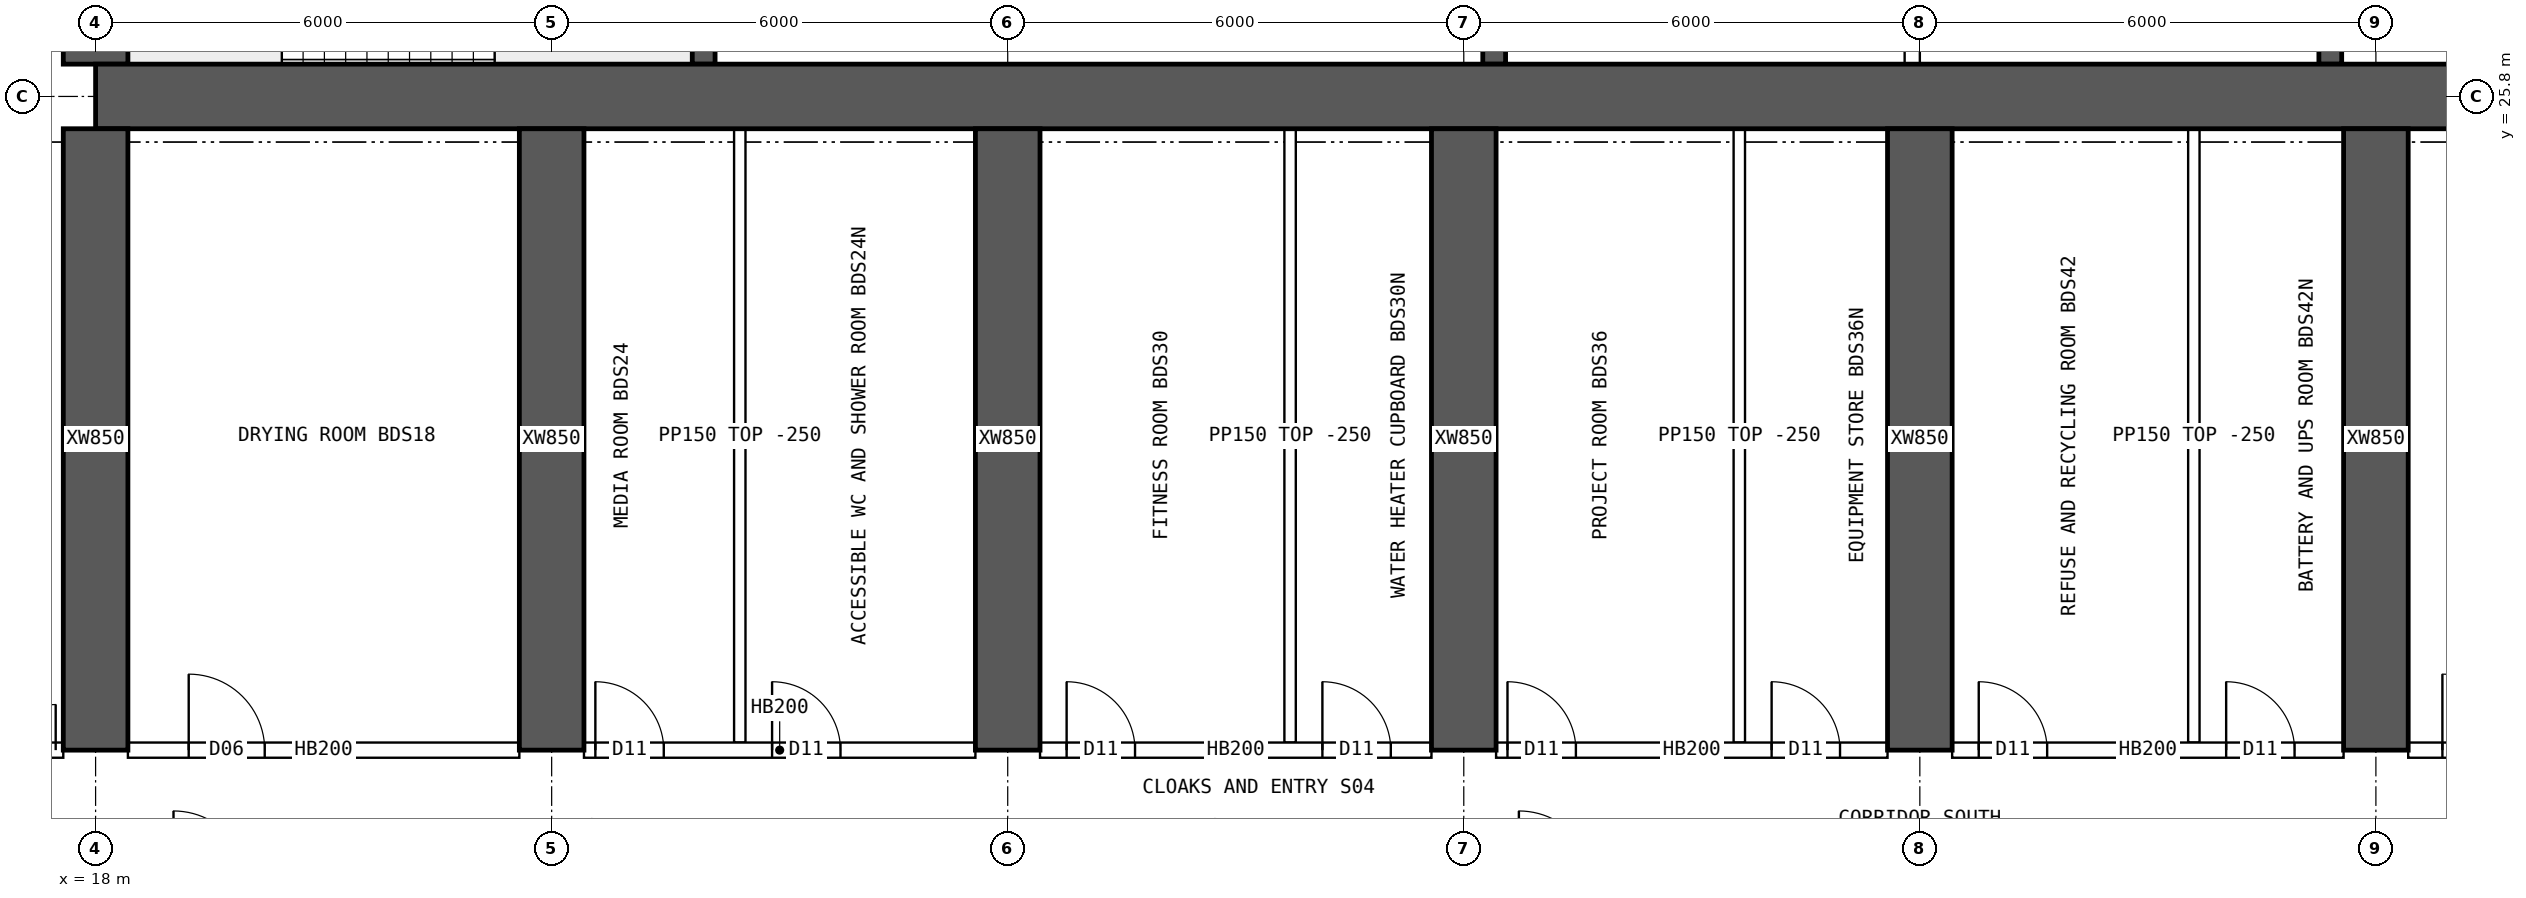
"""IFC4 building model, lengths in metres.
Left out: names, types, materials, properties, quantities, classifications, styles, units other than length and angle.
Written with IfcOpenShell. Run it as: python <this file> out.ifc"""

import sys

from ifc_helpers import new_model, si_unit, direction, frame, frame_2d, origin, place, context, subcontext, project, spatial, rectangle, extrude, element, fill, save


model = new_model("IFC4")
c1 = context("Model", 3, precision=1e-05, world=origin(), true_north=direction((0.0, 1.0)))
c2 = subcontext(c1, "Body", "Model", "MODEL_VIEW")
j1 = project(units=[si_unit("LENGTHUNIT", "METRE"), si_unit("PLANEANGLEUNIT", "RADIAN")], contexts=[c1])
p1 = place(None, origin())
s1 = spatial("IfcSite", under=j1, at=p1, CompositionType="ELEMENT")
p2 = place(p1, origin())
s2 = spatial("IfcBuilding", under=s1, at=p2, CompositionType="ELEMENT")
p3 = place(p2, frame((0.0, 0.0, 148.6)))
s3 = spatial("IfcBuildingStorey", under=s2, at=p3, CompositionType="ELEMENT", Elevation=148.6)
p4 = place(p3, frame((18.0, 25.8, 0.0), z_axis=(0.0, 0.0, 1.0), x_axis=(1.0, 0.0, 0.0)))
e1 = element("IfcWall", 1, at=p4, inside=s3, PredefinedType="SHEAR", context=c2, shape_type="SweptSolid", body=[
    extrude(rectangle(XDim=48.0, YDim=0.85, at=frame_2d((24.0, 0.0))), origin(), (0.0, 0.0, 1.0), 3.75),
])
p5 = place(p3, frame((18.0, 26.225, 0.0), z_axis=(0.0, 0.0, 1.0), x_axis=(0.0, 1.0, 0.0)))
e2 = element("IfcWall", 2, at=p5, inside=s3, PredefinedType="SHEAR", context=c2, shape_type="SweptSolid", body=[
    extrude(rectangle(XDim=11.55, YDim=0.85, at=frame_2d((5.775, 0.0))), origin(), (0.0, 0.0, 1.0), 3.75),
])
p6 = place(p5, frame((5.075, 0.0, 0.0)))
e3 = element("IfcOpeningElement", 3, at=p6, cuts=e2, PredefinedType="OPENING", context=c2, shape_type="SweptSolid", body=[
    extrude(rectangle(XDim=1.2, YDim=2.1, at=frame_2d((0.6, 1.05))), frame((0.0, 0.435, 0.0), z_axis=(0.0, -1.0, 0.0), x_axis=(1.0, 0.0, 0.0)), (0.0, 0.0, 1.0), 0.87),
])
for number, where, z_axis, x_axis in (
    (4, (26.0, 26.225, 0.0), (0.0, 0.0, 1.0), (0.0, 1.0, 0.0)),
    (5, (36.4, 26.225, 0.0), (0.0, 0.0, 1.0), (0.0, 1.0, 0.0)),
    (6, (47.4, 26.225, 0.0), (0.0, 0.0, 1.0), (0.0, 1.0, 0.0)),
):
    element("IfcWall", number, at=place(p3, frame(where, z_axis=z_axis, x_axis=x_axis)), inside=s3, PredefinedType="SHEAR", context=c2, shape_type="SweptSolid", body=[
        extrude(rectangle(XDim=4.025, YDim=0.3, at=frame_2d((2.012, 0.0))), origin(), (0.0, 0.0, 1.0), 3.75),
    ])
for number, where, z_axis, x_axis in (
    (7, (18.0, 17.2, 0.0), (0.0, 0.0, 1.0), (0.0, 1.0, 0.0)),
    (8, (24.0, 17.2, 0.0), (0.0, 0.0, 1.0), (0.0, 1.0, 0.0)),
    (9, (30.0, 17.2, 0.0), (0.0, 0.0, 1.0), (0.0, 1.0, 0.0)),
    (10, (36.0, 17.2, 0.0), (0.0, 0.0, 1.0), (0.0, 1.0, 0.0)),
    (11, (42.0, 17.2, 0.0), (0.0, 0.0, 1.0), (0.0, 1.0, 0.0)),
    (12, (48.0, 17.2, 0.0), (0.0, 0.0, 1.0), (0.0, 1.0, 0.0)),
):
    element("IfcWall", number, at=place(p3, frame(where, z_axis=z_axis, x_axis=x_axis)), inside=s3, PredefinedType="SHEAR", context=c2, shape_type="SweptSolid", body=[
        extrude(rectangle(XDim=8.175, YDim=0.85, at=frame_2d((4.087, 0.0))), origin(), (0.0, 0.0, 1.0), 3.75),
    ])
p7 = place(p3, frame((41.9, 26.225, 0.0), z_axis=(0.0, 0.0, 1.0), x_axis=(0.0, 1.0, 0.0)))
e13 = element("IfcWall", 13, at=p7, inside=s3, PredefinedType="SOLIDWALL", context=c2, shape_type="SweptSolid", body=[
    extrude(rectangle(XDim=4.025, YDim=0.2, at=frame_2d((2.012, 0.0))), origin(), (0.0, 0.0, 1.0), 3.5),
])
p8 = place(p3, frame((15.6, 17.2, 0.0), z_axis=(0.0, 0.0, 1.0), x_axis=(1.0, 0.0, 0.0)))
e14 = element("IfcWall", 14, at=p8, inside=s3, PredefinedType="SOLIDWALL", context=c2, shape_type="SweptSolid", body=[
    extrude(rectangle(XDim=1.975, YDim=0.2, at=frame_2d((0.987, 0.0))), origin(), (0.0, 0.0, 1.0), 3.5),
])
p9 = place(p8, frame((0.675, 0.0, 0.0)))
e15 = element("IfcOpeningElement", 15, at=p9, cuts=e14, PredefinedType="OPENING", context=c2, shape_type="SweptSolid", body=[
    extrude(rectangle(XDim=1.2, YDim=2.1, at=frame_2d((0.6, 1.05))), frame((0.0, 0.11, 0.0), z_axis=(0.0, -1.0, 0.0), x_axis=(1.0, 0.0, 0.0)), (0.0, 0.0, 1.0), 0.22),
])
p10 = place(p3, frame((18.425, 17.2, 0.0), z_axis=(0.0, 0.0, 1.0), x_axis=(1.0, 0.0, 0.0)))
e16 = element("IfcWall", 16, at=p10, inside=s3, PredefinedType="SOLIDWALL", context=c2, shape_type="SweptSolid", body=[
    extrude(rectangle(XDim=5.15, YDim=0.2, at=frame_2d((2.575, 0.0))), origin(), (0.0, 0.0, 1.0), 3.5),
])
p11 = place(p10, frame((0.8, 0.0, 0.0)))
e17 = element("IfcOpeningElement", 17, at=p11, cuts=e16, PredefinedType="OPENING", context=c2, shape_type="SweptSolid", body=[
    extrude(rectangle(XDim=1.0, YDim=2.1, at=frame_2d((0.5, 1.05))), frame((0.0, 0.11, 0.0), z_axis=(0.0, -1.0, 0.0), x_axis=(1.0, 0.0, 0.0)), (0.0, 0.0, 1.0), 0.22),
])
p12 = place(p3, frame((24.425, 17.2, 0.0), z_axis=(0.0, 0.0, 1.0), x_axis=(1.0, 0.0, 0.0)))
e18 = element("IfcWall", 18, at=p12, inside=s3, PredefinedType="SOLIDWALL", context=c2, shape_type="SweptSolid", body=[
    extrude(rectangle(XDim=5.15, YDim=0.2, at=frame_2d((2.575, 0.0))), origin(), (0.0, 0.0, 1.0), 3.5),
])
p13 = place(p12, frame((0.15, 0.0, 0.0)))
e19 = element("IfcOpeningElement", 19, at=p13, cuts=e18, PredefinedType="OPENING", context=c2, shape_type="SweptSolid", body=[
    extrude(rectangle(XDim=0.9, YDim=2.1, at=frame_2d((0.45, 1.05))), frame((0.0, 0.11, 0.0), z_axis=(0.0, -1.0, 0.0), x_axis=(1.0, 0.0, 0.0)), (0.0, 0.0, 1.0), 0.22),
])
p14 = place(p12, frame((2.475, 0.0, 0.0)))
e20 = element("IfcOpeningElement", 20, at=p14, cuts=e18, PredefinedType="OPENING", context=c2, shape_type="SweptSolid", body=[
    extrude(rectangle(XDim=0.9, YDim=2.1, at=frame_2d((0.45, 1.05))), frame((0.0, 0.11, 0.0), z_axis=(0.0, -1.0, 0.0), x_axis=(1.0, 0.0, 0.0)), (0.0, 0.0, 1.0), 0.22),
])
p15 = place(p3, frame((30.425, 17.2, 0.0), z_axis=(0.0, 0.0, 1.0), x_axis=(1.0, 0.0, 0.0)))
e21 = element("IfcWall", 21, at=p15, inside=s3, PredefinedType="SOLIDWALL", context=c2, shape_type="SweptSolid", body=[
    extrude(rectangle(XDim=5.15, YDim=0.2, at=frame_2d((2.575, 0.0))), origin(), (0.0, 0.0, 1.0), 3.5),
])
p16 = place(p15, frame((0.35, 0.0, 0.0)))
e22 = element("IfcOpeningElement", 22, at=p16, cuts=e21, PredefinedType="OPENING", context=c2, shape_type="SweptSolid", body=[
    extrude(rectangle(XDim=0.9, YDim=2.1, at=frame_2d((0.45, 1.05))), frame((0.0, 0.11, 0.0), z_axis=(0.0, -1.0, 0.0), x_axis=(1.0, 0.0, 0.0)), (0.0, 0.0, 1.0), 0.22),
])
p17 = place(p15, frame((3.715, 0.0, 0.0)))
e23 = element("IfcOpeningElement", 23, at=p17, cuts=e21, PredefinedType="OPENING", context=c2, shape_type="SweptSolid", body=[
    extrude(rectangle(XDim=0.9, YDim=2.1, at=frame_2d((0.45, 1.05))), frame((0.0, 0.11, 0.0), z_axis=(0.0, -1.0, 0.0), x_axis=(1.0, 0.0, 0.0)), (0.0, 0.0, 1.0), 0.22),
])
p18 = place(p3, frame((36.425, 17.2, 0.0), z_axis=(0.0, 0.0, 1.0), x_axis=(1.0, 0.0, 0.0)))
e24 = element("IfcWall", 24, at=p18, inside=s3, PredefinedType="SOLIDWALL", context=c2, shape_type="SweptSolid", body=[
    extrude(rectangle(XDim=5.15, YDim=0.2, at=frame_2d((2.575, 0.0))), origin(), (0.0, 0.0, 1.0), 3.5),
])
p19 = place(p18, frame((0.15, 0.0, 0.0)))
e25 = element("IfcOpeningElement", 25, at=p19, cuts=e24, PredefinedType="OPENING", context=c2, shape_type="SweptSolid", body=[
    extrude(rectangle(XDim=0.9, YDim=2.1, at=frame_2d((0.45, 1.05))), frame((0.0, 0.11, 0.0), z_axis=(0.0, -1.0, 0.0), x_axis=(1.0, 0.0, 0.0)), (0.0, 0.0, 1.0), 0.22),
])
p20 = place(p18, frame((3.625, 0.0, 0.0)))
e26 = element("IfcOpeningElement", 26, at=p20, cuts=e24, PredefinedType="OPENING", context=c2, shape_type="SweptSolid", body=[
    extrude(rectangle(XDim=0.9, YDim=2.1, at=frame_2d((0.45, 1.05))), frame((0.0, 0.11, 0.0), z_axis=(0.0, -1.0, 0.0), x_axis=(1.0, 0.0, 0.0)), (0.0, 0.0, 1.0), 0.22),
])
p21 = place(p3, frame((42.425, 17.2, 0.0), z_axis=(0.0, 0.0, 1.0), x_axis=(1.0, 0.0, 0.0)))
e27 = element("IfcWall", 27, at=p21, inside=s3, PredefinedType="SOLIDWALL", context=c2, shape_type="SweptSolid", body=[
    extrude(rectangle(XDim=5.15, YDim=0.2, at=frame_2d((2.575, 0.0))), origin(), (0.0, 0.0, 1.0), 3.5),
])
p22 = place(p21, frame((0.35, 0.0, 0.0)))
e28 = element("IfcOpeningElement", 28, at=p22, cuts=e27, PredefinedType="OPENING", context=c2, shape_type="SweptSolid", body=[
    extrude(rectangle(XDim=0.9, YDim=2.1, at=frame_2d((0.45, 1.05))), frame((0.0, 0.11, 0.0), z_axis=(0.0, -1.0, 0.0), x_axis=(1.0, 0.0, 0.0)), (0.0, 0.0, 1.0), 0.22),
])
p23 = place(p21, frame((3.605, 0.0, 0.0)))
e29 = element("IfcOpeningElement", 29, at=p23, cuts=e27, PredefinedType="OPENING", context=c2, shape_type="SweptSolid", body=[
    extrude(rectangle(XDim=0.9, YDim=2.1, at=frame_2d((0.45, 1.05))), frame((0.0, 0.11, 0.0), z_axis=(0.0, -1.0, 0.0), x_axis=(1.0, 0.0, 0.0)), (0.0, 0.0, 1.0), 0.22),
])
p24 = place(p3, frame((48.425, 17.2, 0.0), z_axis=(0.0, 0.0, 1.0), x_axis=(1.0, 0.0, 0.0)))
e30 = element("IfcWall", 30, at=p24, inside=s3, PredefinedType="SOLIDWALL", context=c2, shape_type="SweptSolid", body=[
    extrude(rectangle(XDim=5.15, YDim=0.2, at=frame_2d((2.575, 0.0))), origin(), (0.0, 0.0, 1.0), 3.5),
])
p25 = place(p24, frame((0.45, 0.0, 0.0)))
e31 = element("IfcOpeningElement", 31, at=p25, cuts=e30, PredefinedType="OPENING", context=c2, shape_type="SweptSolid", body=[
    extrude(rectangle(XDim=1.0, YDim=2.1, at=frame_2d((0.5, 1.05))), frame((0.0, 0.11, 0.0), z_axis=(0.0, -1.0, 0.0), x_axis=(1.0, 0.0, 0.0)), (0.0, 0.0, 1.0), 0.22),
])
for number, where, z_axis, x_axis in (
    (32, (26.475, 17.3, 0.0), (0.0, 0.0, 1.0), (0.0, 1.0, 0.0)),
    (33, (33.715, 17.3, 0.0), (0.0, 0.0, 1.0), (0.0, 1.0, 0.0)),
    (34, (39.625, 17.3, 0.0), (0.0, 0.0, 1.0), (0.0, 1.0, 0.0)),
    (35, (45.605, 17.3, 0.0), (0.0, 0.0, 1.0), (0.0, 1.0, 0.0)),
):
    element("IfcWall", number, at=place(p3, frame(where, z_axis=z_axis, x_axis=x_axis)), inside=s3, PredefinedType="PARTITIONING", context=c2, shape_type="SweptSolid", body=[
        extrude(rectangle(XDim=8.075, YDim=0.15, at=frame_2d((4.038, 0.0))), origin(), (0.0, 0.0, 1.0), 3.5),
    ])
p26 = place(p9, origin())
e36 = element("IfcDoor", 36, at=p26, inside=s3, OperationType="DOUBLE_DOOR_SINGLE_SWING", PredefinedType="DOOR", context=c2, shape_type="SweptSolid", body=[
    extrude(rectangle(XDim=1.2, YDim=2.1, at=frame_2d((0.6, 1.05))), frame((0.0, 0.025, 0.0), z_axis=(0.0, -1.0, 0.0), x_axis=(1.0, 0.0, 0.0)), (0.0, 0.0, 1.0), 0.05),
])
fill(e15, e36)
p27 = place(p11, origin())
e37 = element("IfcDoor", 37, at=p27, inside=s3, OperationType="SINGLE_SWING_LEFT", PredefinedType="DOOR", context=c2, shape_type="SweptSolid", body=[
    extrude(rectangle(XDim=1.0, YDim=2.1, at=frame_2d((0.5, 1.05))), frame((0.0, 0.025, 0.0), z_axis=(0.0, -1.0, 0.0), x_axis=(1.0, 0.0, 0.0)), (0.0, 0.0, 1.0), 0.05),
])
fill(e17, e37)
p28 = place(p13, origin())
e38 = element("IfcDoor", 38, at=p28, inside=s3, OperationType="SINGLE_SWING_LEFT", PredefinedType="DOOR", context=c2, shape_type="SweptSolid", body=[
    extrude(rectangle(XDim=0.9, YDim=2.1, at=frame_2d((0.45, 1.05))), frame((0.0, 0.025, 0.0), z_axis=(0.0, -1.0, 0.0), x_axis=(1.0, 0.0, 0.0)), (0.0, 0.0, 1.0), 0.05),
])
fill(e19, e38)
p29 = place(p14, origin())
e39 = element("IfcDoor", 39, at=p29, inside=s3, OperationType="SINGLE_SWING_LEFT", PredefinedType="DOOR", context=c2, shape_type="SweptSolid", body=[
    extrude(rectangle(XDim=0.9, YDim=2.1, at=frame_2d((0.45, 1.05))), frame((0.0, 0.025, 0.0), z_axis=(0.0, -1.0, 0.0), x_axis=(1.0, 0.0, 0.0)), (0.0, 0.0, 1.0), 0.05),
])
fill(e20, e39)
p30 = place(p16, origin())
e40 = element("IfcDoor", 40, at=p30, inside=s3, OperationType="SINGLE_SWING_LEFT", PredefinedType="DOOR", context=c2, shape_type="SweptSolid", body=[
    extrude(rectangle(XDim=0.9, YDim=2.1, at=frame_2d((0.45, 1.05))), frame((0.0, 0.025, 0.0), z_axis=(0.0, -1.0, 0.0), x_axis=(1.0, 0.0, 0.0)), (0.0, 0.0, 1.0), 0.05),
])
fill(e22, e40)
p31 = place(p17, origin())
e41 = element("IfcDoor", 41, at=p31, inside=s3, OperationType="SINGLE_SWING_LEFT", PredefinedType="DOOR", context=c2, shape_type="SweptSolid", body=[
    extrude(rectangle(XDim=0.9, YDim=2.1, at=frame_2d((0.45, 1.05))), frame((0.0, 0.025, 0.0), z_axis=(0.0, -1.0, 0.0), x_axis=(1.0, 0.0, 0.0)), (0.0, 0.0, 1.0), 0.05),
])
fill(e23, e41)
p32 = place(p19, origin())
e42 = element("IfcDoor", 42, at=p32, inside=s3, OperationType="SINGLE_SWING_LEFT", PredefinedType="DOOR", context=c2, shape_type="SweptSolid", body=[
    extrude(rectangle(XDim=0.9, YDim=2.1, at=frame_2d((0.45, 1.05))), frame((0.0, 0.025, 0.0), z_axis=(0.0, -1.0, 0.0), x_axis=(1.0, 0.0, 0.0)), (0.0, 0.0, 1.0), 0.05),
])
fill(e25, e42)
p33 = place(p20, origin())
e43 = element("IfcDoor", 43, at=p33, inside=s3, OperationType="SINGLE_SWING_LEFT", PredefinedType="DOOR", context=c2, shape_type="SweptSolid", body=[
    extrude(rectangle(XDim=0.9, YDim=2.1, at=frame_2d((0.45, 1.05))), frame((0.0, 0.025, 0.0), z_axis=(0.0, -1.0, 0.0), x_axis=(1.0, 0.0, 0.0)), (0.0, 0.0, 1.0), 0.05),
])
fill(e26, e43)
p34 = place(p22, origin())
e44 = element("IfcDoor", 44, at=p34, inside=s3, OperationType="SINGLE_SWING_LEFT", PredefinedType="DOOR", context=c2, shape_type="SweptSolid", body=[
    extrude(rectangle(XDim=0.9, YDim=2.1, at=frame_2d((0.45, 1.05))), frame((0.0, 0.025, 0.0), z_axis=(0.0, -1.0, 0.0), x_axis=(1.0, 0.0, 0.0)), (0.0, 0.0, 1.0), 0.05),
])
fill(e28, e44)
p35 = place(p23, origin())
e45 = element("IfcDoor", 45, at=p35, inside=s3, OperationType="SINGLE_SWING_LEFT", PredefinedType="DOOR", context=c2, shape_type="SweptSolid", body=[
    extrude(rectangle(XDim=0.9, YDim=2.1, at=frame_2d((0.45, 1.05))), frame((0.0, 0.025, 0.0), z_axis=(0.0, -1.0, 0.0), x_axis=(1.0, 0.0, 0.0)), (0.0, 0.0, 1.0), 0.05),
])
fill(e29, e45)
p36 = place(p25, origin())
e46 = element("IfcDoor", 46, at=p36, inside=s3, OperationType="SINGLE_SWING_LEFT", PredefinedType="DOOR", context=c2, shape_type="SweptSolid", body=[
    extrude(rectangle(XDim=1.0, YDim=2.1, at=frame_2d((0.5, 1.05))), frame((0.0, 0.025, 0.0), z_axis=(0.0, -1.0, 0.0), x_axis=(1.0, 0.0, 0.0)), (0.0, 0.0, 1.0), 0.05),
])
fill(e31, e46)
save(model, sys.argv[1])
